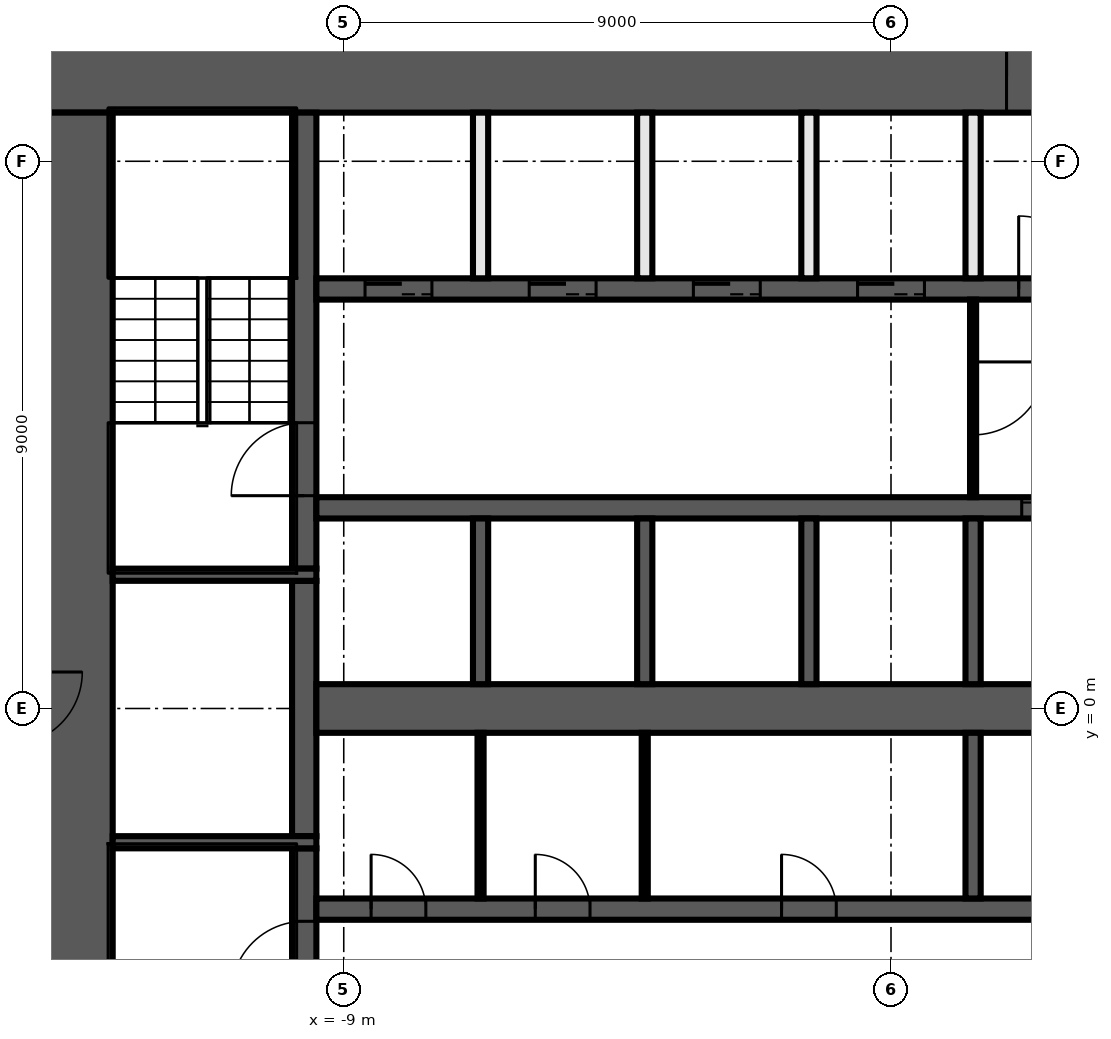
"""IFC4 building model, lengths in metres.
Left out: names, types, materials, properties, quantities, classifications, styles, units other than length and angle.
Written with IfcOpenShell. Run it as: python <this file> out.ifc"""

import sys

from ifc_helpers import new_model, si_unit, direction, frame, frame_2d, origin, place, context, subcontext, project, spatial, rectangle, extrude, element, fill, save


model = new_model("IFC4")
c1 = context("Model", 3, precision=1e-05, world=origin(), true_north=direction((0.0, 1.0)))
c2 = subcontext(c1, "Body", "Model", "MODEL_VIEW")
j1 = project(units=[si_unit("LENGTHUNIT", "METRE"), si_unit("PLANEANGLEUNIT", "RADIAN")], contexts=[c1])
p1 = place(None, origin())
s1 = spatial("IfcSite", under=j1, at=p1, CompositionType="ELEMENT")
p2 = place(p1, origin())
s2 = spatial("IfcBuilding", under=s1, at=p2, CompositionType="ELEMENT")
p3 = place(p2, frame((0.0, 0.0, -11.5)))
s3 = spatial("IfcBuildingStorey", under=s2, at=p3, CompositionType="ELEMENT", Elevation=-11.5)
p4 = place(p3, frame((-14.0, 10.4, 0.0), z_axis=(0.0, 0.0, 1.0), x_axis=(1.0, 0.0, 0.0)))
e1 = element("IfcWall", 1, at=p4, inside=s3, PredefinedType="SHEAR", context=c2, shape_type="SweptSolid", body=[
    extrude(rectangle(XDim=28.0, YDim=1.2, at=frame_2d((14.0, 0.0))), origin(), (0.0, 0.0, 1.0), 5.1),
])
p5 = place(p4, frame((15.9, 0.0, 0.0)))
e2 = element("IfcOpeningElement", 2, at=p5, cuts=e1, PredefinedType="OPENING", context=c2, shape_type="SweptSolid", body=[
    extrude(rectangle(XDim=1.6, YDim=2.1, at=frame_2d((0.8, 1.05))), frame((0.0, 0.61, 0.0), z_axis=(0.0, -1.0, 0.0), x_axis=(1.0, 0.0, 0.0)), (0.0, 0.0, 1.0), 1.22),
])
p6 = place(p3, frame((-13.4, -9.8, 0.0), z_axis=(0.0, 0.0, 1.0), x_axis=(0.0, 1.0, 0.0)))
e3 = element("IfcWall", 3, at=p6, inside=s3, PredefinedType="SHEAR", context=c2, shape_type="SweptSolid", body=[
    extrude(rectangle(XDim=19.6, YDim=1.2, at=frame_2d((9.8, 0.0))), origin(), (0.0, 0.0, 1.0), 5.1),
])
p7 = place(p3, frame((-9.65, -9.8, 0.0), z_axis=(0.0, 0.0, 1.0), x_axis=(0.0, 1.0, 0.0)))
e4 = element("IfcWall", 4, at=p7, inside=s3, PredefinedType="SHEAR", context=c2, shape_type="SweptSolid", body=[
    extrude(rectangle(XDim=7.5, YDim=0.4, at=frame_2d((3.75, 0.0))), origin(), (0.0, 0.0, 1.0), 5.1),
])
p8 = place(p7, frame((5.1, 0.0, 0.0)))
e5 = element("IfcOpeningElement", 5, at=p8, cuts=e4, PredefinedType="OPENING", context=c2, shape_type="SweptSolid", body=[
    extrude(rectangle(XDim=1.2, YDim=2.1, at=frame_2d((0.6, 1.05))), frame((0.0, 0.21, 0.0), z_axis=(0.0, -1.0, 0.0), x_axis=(1.0, 0.0, 0.0)), (0.0, 0.0, 1.0), 0.42),
])
p9 = place(p3, frame((-9.65, -2.1, 0.0), z_axis=(0.0, 0.0, 1.0), x_axis=(0.0, 1.0, 0.0)))
e6 = element("IfcWall", 6, at=p9, inside=s3, PredefinedType="SHEAR", context=c2, shape_type="SweptSolid", body=[
    extrude(rectangle(XDim=4.2, YDim=0.4, at=frame_2d((2.1, 0.0))), origin(), (0.0, 0.0, 1.0), 5.1),
])
p10 = place(p3, frame((-9.65, 2.3, 0.0), z_axis=(0.0, 0.0, 1.0), x_axis=(0.0, 1.0, 0.0)))
e7 = element("IfcWall", 7, at=p10, inside=s3, PredefinedType="SHEAR", context=c2, shape_type="SweptSolid", body=[
    extrude(rectangle(XDim=7.5, YDim=0.4, at=frame_2d((3.75, 0.0))), origin(), (0.0, 0.0, 1.0), 5.1),
])
p11 = place(p10, frame((1.2, 0.0, 0.0)))
e8 = element("IfcOpeningElement", 8, at=p11, cuts=e7, PredefinedType="OPENING", context=c2, shape_type="SweptSolid", body=[
    extrude(rectangle(XDim=1.2, YDim=2.1, at=frame_2d((0.6, 1.05))), frame((0.0, 0.21, 0.0), z_axis=(0.0, -1.0, 0.0), x_axis=(1.0, 0.0, 0.0)), (0.0, 0.0, 1.0), 0.42),
])
for number, where, z_axis, x_axis in (
    (9, (-9.45, 2.2, 0.0), (0.0, 0.0, 1.0), (-1.0, 0.0, 0.0)),
    (10, (-9.45, -2.2, 0.0), (0.0, 0.0, 1.0), (-1.0, 0.0, 0.0)),
):
    element("IfcWall", number, at=place(p3, frame(where, z_axis=z_axis, x_axis=x_axis)), inside=s3, PredefinedType="SHEAR", context=c2, shape_type="SweptSolid", body=[
        extrude(rectangle(XDim=3.35, YDim=0.2, at=frame_2d((1.675, 0.0))), origin(), (0.0, 0.0, 1.0), 5.1),
    ])
p12 = place(p3, frame((-9.45, 6.9, 0.0), z_axis=(0.0, 0.0, 1.0), x_axis=(1.0, 0.0, 0.0)))
e11 = element("IfcWall", 11, at=p12, inside=s3, PredefinedType="SHEAR", context=c2, shape_type="SweptSolid", body=[
    extrude(rectangle(XDim=18.9, YDim=0.35, at=frame_2d((9.45, 0.0))), origin(), (0.0, 0.0, 1.0), 5.1),
])
p13 = place(p12, frame((0.8, 0.0, 0.0)))
e12 = element("IfcOpeningElement", 12, at=p13, cuts=e11, PredefinedType="OPENING", context=c2, shape_type="SweptSolid", body=[
    extrude(rectangle(XDim=1.1, YDim=2.1, at=frame_2d((0.55, 1.05))), frame((0.0, 0.185, 0.0), z_axis=(0.0, -1.0, 0.0), x_axis=(1.0, 0.0, 0.0)), (0.0, 0.0, 1.0), 0.37),
])
p14 = place(p12, frame((3.5, 0.0, 0.0)))
e13 = element("IfcOpeningElement", 13, at=p14, cuts=e11, PredefinedType="OPENING", context=c2, shape_type="SweptSolid", body=[
    extrude(rectangle(XDim=1.1, YDim=2.1, at=frame_2d((0.55, 1.05))), frame((0.0, 0.185, 0.0), z_axis=(0.0, -1.0, 0.0), x_axis=(1.0, 0.0, 0.0)), (0.0, 0.0, 1.0), 0.37),
])
p15 = place(p12, frame((6.2, 0.0, 0.0)))
e14 = element("IfcOpeningElement", 14, at=p15, cuts=e11, PredefinedType="OPENING", context=c2, shape_type="SweptSolid", body=[
    extrude(rectangle(XDim=1.1, YDim=2.1, at=frame_2d((0.55, 1.05))), frame((0.0, 0.185, 0.0), z_axis=(0.0, -1.0, 0.0), x_axis=(1.0, 0.0, 0.0)), (0.0, 0.0, 1.0), 0.37),
])
p16 = place(p12, frame((8.9, 0.0, 0.0)))
e15 = element("IfcOpeningElement", 15, at=p16, cuts=e11, PredefinedType="OPENING", context=c2, shape_type="SweptSolid", body=[
    extrude(rectangle(XDim=1.1, YDim=2.1, at=frame_2d((0.55, 1.05))), frame((0.0, 0.185, 0.0), z_axis=(0.0, -1.0, 0.0), x_axis=(1.0, 0.0, 0.0)), (0.0, 0.0, 1.0), 0.37),
])
p17 = place(p12, frame((11.55, 0.0, 0.0)))
e16 = element("IfcOpeningElement", 16, at=p17, cuts=e11, PredefinedType="OPENING", context=c2, shape_type="SweptSolid", body=[
    extrude(rectangle(XDim=1.2, YDim=2.1, at=frame_2d((0.6, 1.05))), frame((0.0, 0.185, 0.0), z_axis=(0.0, -1.0, 0.0), x_axis=(1.0, 0.0, 0.0)), (0.0, 0.0, 1.0), 0.37),
])
p18 = place(p12, frame((14.3, 0.0, 0.0)))
e17 = element("IfcOpeningElement", 17, at=p18, cuts=e11, PredefinedType="OPENING", context=c2, shape_type="SweptSolid", body=[
    extrude(rectangle(XDim=1.1, YDim=2.1, at=frame_2d((0.55, 1.05))), frame((0.0, 0.185, 0.0), z_axis=(0.0, -1.0, 0.0), x_axis=(1.0, 0.0, 0.0)), (0.0, 0.0, 1.0), 0.37),
])
p19 = place(p12, frame((17.0, 0.0, 0.0)))
e18 = element("IfcOpeningElement", 18, at=p19, cuts=e11, PredefinedType="OPENING", context=c2, shape_type="SweptSolid", body=[
    extrude(rectangle(XDim=1.1, YDim=2.1, at=frame_2d((0.55, 1.05))), frame((0.0, 0.185, 0.0), z_axis=(0.0, -1.0, 0.0), x_axis=(1.0, 0.0, 0.0)), (0.0, 0.0, 1.0), 0.37),
])
p20 = place(p3, frame((9.45, 3.3, 0.0), z_axis=(0.0, 0.0, 1.0), x_axis=(-1.0, 0.0, 0.0)))
e19 = element("IfcWall", 19, at=p20, inside=s3, PredefinedType="SHEAR", context=c2, shape_type="SweptSolid", body=[
    extrude(rectangle(XDim=18.9, YDim=0.35, at=frame_2d((9.45, 0.0))), origin(), (0.0, 0.0, 1.0), 5.1),
])
p21 = place(p20, frame((6.2, 0.0, 0.0)))
e20 = element("IfcOpeningElement", 20, at=p21, cuts=e19, PredefinedType="OPENING", context=c2, shape_type="SweptSolid", body=[
    extrude(rectangle(XDim=1.1, YDim=2.1, at=frame_2d((0.55, 1.05))), frame((0.0, 0.185, 0.0), z_axis=(0.0, -1.0, 0.0), x_axis=(1.0, 0.0, 0.0)), (0.0, 0.0, 1.0), 0.37),
])
p22 = place(p20, frame((3.5, 0.0, 0.0)))
e21 = element("IfcOpeningElement", 21, at=p22, cuts=e19, PredefinedType="OPENING", context=c2, shape_type="SweptSolid", body=[
    extrude(rectangle(XDim=1.1, YDim=2.1, at=frame_2d((0.55, 1.05))), frame((0.0, 0.185, 0.0), z_axis=(0.0, -1.0, 0.0), x_axis=(1.0, 0.0, 0.0)), (0.0, 0.0, 1.0), 0.37),
])
p23 = place(p20, frame((0.9, 0.0, 0.0)))
e22 = element("IfcOpeningElement", 22, at=p23, cuts=e19, PredefinedType="OPENING", context=c2, shape_type="SweptSolid", body=[
    extrude(rectangle(XDim=0.9, YDim=2.1, at=frame_2d((0.45, 1.05))), frame((0.0, 0.185, 0.0), z_axis=(0.0, -1.0, 0.0), x_axis=(1.0, 0.0, 0.0)), (0.0, 0.0, 1.0), 0.37),
])
p24 = place(p3, frame((-9.45, -3.3, 0.0), z_axis=(0.0, 0.0, 1.0), x_axis=(1.0, 0.0, 0.0)))
e23 = element("IfcWall", 23, at=p24, inside=s3, PredefinedType="SHEAR", context=c2, shape_type="SweptSolid", body=[
    extrude(rectangle(XDim=18.9, YDim=0.35, at=frame_2d((9.45, 0.0))), origin(), (0.0, 0.0, 1.0), 5.1),
])
p25 = place(p24, frame((17.0, 0.0, 0.0)))
e24 = element("IfcOpeningElement", 24, at=p25, cuts=e23, PredefinedType="OPENING", context=c2, shape_type="SweptSolid", body=[
    extrude(rectangle(XDim=1.1, YDim=2.1, at=frame_2d((0.55, 1.05))), frame((0.0, 0.185, 0.0), z_axis=(0.0, -1.0, 0.0), x_axis=(1.0, 0.0, 0.0)), (0.0, 0.0, 1.0), 0.37),
])
p26 = place(p24, frame((0.9, 0.0, 0.0)))
e25 = element("IfcOpeningElement", 25, at=p26, cuts=e23, PredefinedType="OPENING", context=c2, shape_type="SweptSolid", body=[
    extrude(rectangle(XDim=0.9, YDim=2.1, at=frame_2d((0.45, 1.05))), frame((0.0, 0.185, 0.0), z_axis=(0.0, -1.0, 0.0), x_axis=(1.0, 0.0, 0.0)), (0.0, 0.0, 1.0), 0.37),
])
p27 = place(p24, frame((3.6, 0.0, 0.0)))
e26 = element("IfcOpeningElement", 26, at=p27, cuts=e23, PredefinedType="OPENING", context=c2, shape_type="SweptSolid", body=[
    extrude(rectangle(XDim=0.9, YDim=2.1, at=frame_2d((0.45, 1.05))), frame((0.0, 0.185, 0.0), z_axis=(0.0, -1.0, 0.0), x_axis=(1.0, 0.0, 0.0)), (0.0, 0.0, 1.0), 0.37),
])
p28 = place(p24, frame((7.65, 0.0, 0.0)))
e27 = element("IfcOpeningElement", 27, at=p28, cuts=e23, PredefinedType="OPENING", context=c2, shape_type="SweptSolid", body=[
    extrude(rectangle(XDim=0.9, YDim=2.1, at=frame_2d((0.45, 1.05))), frame((0.0, 0.185, 0.0), z_axis=(0.0, -1.0, 0.0), x_axis=(1.0, 0.0, 0.0)), (0.0, 0.0, 1.0), 0.37),
])
p29 = place(p3, frame((-9.45, 0.0, 0.0), z_axis=(0.0, 0.0, 1.0), x_axis=(1.0, 0.0, 0.0)))
e28 = element("IfcWall", 28, at=p29, inside=s3, PredefinedType="SHEAR", context=c2, shape_type="SweptSolid", body=[
    extrude(rectangle(XDim=18.9, YDim=0.8, at=frame_2d((9.45, 0.0))), origin(), (0.0, 0.0, 1.0), 5.1),
])
p30 = place(p3, frame((1.35, 6.725, 0.0), z_axis=(0.0, 0.0, 1.0), x_axis=(0.0, -1.0, 0.0)))
e29 = element("IfcWall", 29, at=p30, inside=s3, PredefinedType="PARTITIONING", context=c2, shape_type="SweptSolid", body=[
    extrude(rectangle(XDim=3.25, YDim=0.1, at=frame_2d((1.625, 0.0))), origin(), (0.0, 0.0, 1.0), 5.1),
])
p31 = place(p30, frame((1.025, 0.0, 0.0)))
e30 = element("IfcOpeningElement", 30, at=p31, cuts=e29, PredefinedType="OPENING", context=c2, shape_type="SweptSolid", body=[
    extrude(rectangle(XDim=1.2, YDim=2.1, at=frame_2d((0.6, 1.05))), frame((0.0, 0.06, 0.0), z_axis=(0.0, -1.0, 0.0), x_axis=(1.0, 0.0, 0.0)), (0.0, 0.0, 1.0), 0.12),
])
for number, where, z_axis, x_axis in (
    (31, (1.35, -3.125, 0.0), (0.0, 0.0, 1.0), (0.0, 1.0, 0.0)),
    (32, (1.35, 0.4, 0.0), (0.0, 0.0, 1.0), (0.0, 1.0, 0.0)),
):
    element("IfcWall", number, at=place(p3, frame(where, z_axis=z_axis, x_axis=x_axis)), inside=s3, PredefinedType="SHEAR", context=c2, shape_type="SweptSolid", body=[
        extrude(rectangle(XDim=2.725, YDim=0.25, at=frame_2d((1.363, 0.0))), origin(), (0.0, 0.0, 1.0), 5.1),
    ])
p32 = place(p3, frame((1.35, 7.075, 0.0), z_axis=(0.0, 0.0, 1.0), x_axis=(0.0, 1.0, 0.0)))
e33 = element("IfcWall", 33, at=p32, inside=s3, PredefinedType="SOLIDWALL", context=c2, shape_type="SweptSolid", body=[
    extrude(rectangle(XDim=2.725, YDim=0.25, at=frame_2d((1.363, 0.0))), origin(), (0.0, 0.0, 1.0), 5.1),
])
p33 = place(p3, frame((-1.35, 0.4, 0.0), z_axis=(0.0, 0.0, 1.0), x_axis=(0.0, 1.0, 0.0)))
e34 = element("IfcWall", 34, at=p33, inside=s3, PredefinedType="SHEAR", context=c2, shape_type="SweptSolid", body=[
    extrude(rectangle(XDim=2.725, YDim=0.25, at=frame_2d((1.363, 0.0))), origin(), (0.0, 0.0, 1.0), 5.1),
])
p34 = place(p3, frame((-1.35, 7.075, 0.0), z_axis=(0.0, 0.0, 1.0), x_axis=(0.0, 1.0, 0.0)))
e35 = element("IfcWall", 35, at=p34, inside=s3, PredefinedType="SOLIDWALL", context=c2, shape_type="SweptSolid", body=[
    extrude(rectangle(XDim=2.725, YDim=0.25, at=frame_2d((1.363, 0.0))), origin(), (0.0, 0.0, 1.0), 5.1),
])
p35 = place(p3, frame((-4.05, -3.125, 0.0), z_axis=(0.0, 0.0, 1.0), x_axis=(0.0, 1.0, 0.0)))
e36 = element("IfcWall", 36, at=p35, inside=s3, PredefinedType="PARTITIONING", context=c2, shape_type="SweptSolid", body=[
    extrude(rectangle(XDim=2.725, YDim=0.1, at=frame_2d((1.363, 0.0))), origin(), (0.0, 0.0, 1.0), 5.1),
])
p36 = place(p3, frame((-4.05, 0.4, 0.0), z_axis=(0.0, 0.0, 1.0), x_axis=(0.0, 1.0, 0.0)))
e37 = element("IfcWall", 37, at=p36, inside=s3, PredefinedType="SHEAR", context=c2, shape_type="SweptSolid", body=[
    extrude(rectangle(XDim=2.725, YDim=0.25, at=frame_2d((1.363, 0.0))), origin(), (0.0, 0.0, 1.0), 5.1),
])
p37 = place(p3, frame((-4.05, 7.075, 0.0), z_axis=(0.0, 0.0, 1.0), x_axis=(0.0, 1.0, 0.0)))
e38 = element("IfcWall", 38, at=p37, inside=s3, PredefinedType="SOLIDWALL", context=c2, shape_type="SweptSolid", body=[
    extrude(rectangle(XDim=2.725, YDim=0.25, at=frame_2d((1.363, 0.0))), origin(), (0.0, 0.0, 1.0), 5.1),
])
p38 = place(p3, frame((-6.75, -3.125, 0.0), z_axis=(0.0, 0.0, 1.0), x_axis=(0.0, 1.0, 0.0)))
e39 = element("IfcWall", 39, at=p38, inside=s3, PredefinedType="PARTITIONING", context=c2, shape_type="SweptSolid", body=[
    extrude(rectangle(XDim=2.725, YDim=0.1, at=frame_2d((1.363, 0.0))), origin(), (0.0, 0.0, 1.0), 5.1),
])
p39 = place(p3, frame((-6.75, 0.4, 0.0), z_axis=(0.0, 0.0, 1.0), x_axis=(0.0, 1.0, 0.0)))
e40 = element("IfcWall", 40, at=p39, inside=s3, PredefinedType="SHEAR", context=c2, shape_type="SweptSolid", body=[
    extrude(rectangle(XDim=2.725, YDim=0.25, at=frame_2d((1.363, 0.0))), origin(), (0.0, 0.0, 1.0), 5.1),
])
p40 = place(p3, frame((-6.75, 7.075, 0.0), z_axis=(0.0, 0.0, 1.0), x_axis=(0.0, 1.0, 0.0)))
e41 = element("IfcWall", 41, at=p40, inside=s3, PredefinedType="SOLIDWALL", context=c2, shape_type="SweptSolid", body=[
    extrude(rectangle(XDim=2.725, YDim=0.25, at=frame_2d((1.363, 0.0))), origin(), (0.0, 0.0, 1.0), 5.1),
])
p41 = place(p13, origin())
e42 = element("IfcDoor", 42, at=p41, inside=s3, OperationType="DOUBLE_DOOR_SLIDING", PredefinedType="DOOR", context=c2, shape_type="SweptSolid", body=[
    extrude(rectangle(XDim=1.1, YDim=2.1, at=frame_2d((0.55, 1.05))), frame((0.0, 0.025, 0.0), z_axis=(0.0, -1.0, 0.0), x_axis=(1.0, 0.0, 0.0)), (0.0, 0.0, 1.0), 0.05),
])
fill(e12, e42)
p42 = place(p14, origin())
e43 = element("IfcDoor", 43, at=p42, inside=s3, OperationType="DOUBLE_DOOR_SLIDING", PredefinedType="DOOR", context=c2, shape_type="SweptSolid", body=[
    extrude(rectangle(XDim=1.1, YDim=2.1, at=frame_2d((0.55, 1.05))), frame((0.0, 0.025, 0.0), z_axis=(0.0, -1.0, 0.0), x_axis=(1.0, 0.0, 0.0)), (0.0, 0.0, 1.0), 0.05),
])
fill(e13, e43)
p43 = place(p15, origin())
e44 = element("IfcDoor", 44, at=p43, inside=s3, OperationType="DOUBLE_DOOR_SLIDING", PredefinedType="DOOR", context=c2, shape_type="SweptSolid", body=[
    extrude(rectangle(XDim=1.1, YDim=2.1, at=frame_2d((0.55, 1.05))), frame((0.0, 0.025, 0.0), z_axis=(0.0, -1.0, 0.0), x_axis=(1.0, 0.0, 0.0)), (0.0, 0.0, 1.0), 0.05),
])
fill(e14, e44)
p44 = place(p16, origin())
e45 = element("IfcDoor", 45, at=p44, inside=s3, OperationType="DOUBLE_DOOR_SLIDING", PredefinedType="DOOR", context=c2, shape_type="SweptSolid", body=[
    extrude(rectangle(XDim=1.1, YDim=2.1, at=frame_2d((0.55, 1.05))), frame((0.0, 0.025, 0.0), z_axis=(0.0, -1.0, 0.0), x_axis=(1.0, 0.0, 0.0)), (0.0, 0.0, 1.0), 0.05),
])
fill(e15, e45)
p45 = place(p5, origin())
e46 = element("IfcDoor", 46, at=p45, inside=s3, OperationType="DOUBLE_DOOR_SINGLE_SWING", PredefinedType="DOOR", context=c2, shape_type="SweptSolid", body=[
    extrude(rectangle(XDim=1.6, YDim=2.1, at=frame_2d((0.8, 1.05))), frame((0.0, 0.025, 0.0), z_axis=(0.0, -1.0, 0.0), x_axis=(1.0, 0.0, 0.0)), (0.0, 0.0, 1.0), 0.05),
])
fill(e2, e46)
p46 = place(p17, origin())
e47 = element("IfcDoor", 47, at=p46, inside=s3, OperationType="SINGLE_SWING_LEFT", PredefinedType="DOOR", context=c2, shape_type="SweptSolid", body=[
    extrude(rectangle(XDim=1.2, YDim=2.1, at=frame_2d((0.6, 1.05))), frame((0.0, 0.025, 0.0), z_axis=(0.0, -1.0, 0.0), x_axis=(1.0, 0.0, 0.0)), (0.0, 0.0, 1.0), 0.05),
])
fill(e16, e47)
p47 = place(p21, origin())
e48 = element("IfcDoor", 48, at=p47, inside=s3, OperationType="DOUBLE_DOOR_SLIDING", PredefinedType="DOOR", context=c2, shape_type="SweptSolid", body=[
    extrude(rectangle(XDim=1.1, YDim=2.1, at=frame_2d((0.55, 1.05))), frame((0.0, 0.025, 0.0), z_axis=(0.0, -1.0, 0.0), x_axis=(1.0, 0.0, 0.0)), (0.0, 0.0, 1.0), 0.05),
])
fill(e20, e48)
p48 = place(p26, origin())
e49 = element("IfcDoor", 49, at=p48, inside=s3, OperationType="SINGLE_SWING_RIGHT", PredefinedType="DOOR", context=c2, shape_type="SweptSolid", body=[
    extrude(rectangle(XDim=0.9, YDim=2.1, at=frame_2d((0.45, 1.05))), frame((0.0, 0.025, 0.0), z_axis=(0.0, -1.0, 0.0), x_axis=(1.0, 0.0, 0.0)), (0.0, 0.0, 1.0), 0.05),
])
fill(e25, e49)
p49 = place(p27, origin())
e50 = element("IfcDoor", 50, at=p49, inside=s3, OperationType="SINGLE_SWING_LEFT", PredefinedType="DOOR", context=c2, shape_type="SweptSolid", body=[
    extrude(rectangle(XDim=0.9, YDim=2.1, at=frame_2d((0.45, 1.05))), frame((0.0, 0.025, 0.0), z_axis=(0.0, -1.0, 0.0), x_axis=(1.0, 0.0, 0.0)), (0.0, 0.0, 1.0), 0.05),
])
fill(e26, e50)
p50 = place(p28, origin())
e51 = element("IfcDoor", 51, at=p50, inside=s3, OperationType="SINGLE_SWING_RIGHT", PredefinedType="DOOR", context=c2, shape_type="SweptSolid", body=[
    extrude(rectangle(XDim=0.9, YDim=2.1, at=frame_2d((0.45, 1.05))), frame((0.0, 0.025, 0.0), z_axis=(0.0, -1.0, 0.0), x_axis=(1.0, 0.0, 0.0)), (0.0, 0.0, 1.0), 0.05),
])
fill(e27, e51)
p51 = place(p11, origin())
e52 = element("IfcDoor", 52, at=p51, inside=s3, OperationType="SINGLE_SWING_RIGHT", PredefinedType="DOOR", context=c2, shape_type="SweptSolid", body=[
    extrude(rectangle(XDim=1.2, YDim=2.1, at=frame_2d((0.6, 1.05))), frame((0.0, 0.025, 0.0), z_axis=(0.0, -1.0, 0.0), x_axis=(1.0, 0.0, 0.0)), (0.0, 0.0, 1.0), 0.05),
])
fill(e8, e52)
p52 = place(p8, origin())
e53 = element("IfcDoor", 53, at=p52, inside=s3, OperationType="SINGLE_SWING_LEFT", PredefinedType="DOOR", context=c2, shape_type="SweptSolid", body=[
    extrude(rectangle(XDim=1.2, YDim=2.1, at=frame_2d((0.6, 1.05))), frame((0.0, 0.025, 0.0), z_axis=(0.0, -1.0, 0.0), x_axis=(1.0, 0.0, 0.0)), (0.0, 0.0, 1.0), 0.05),
])
fill(e5, e53)
p53 = place(p31, origin())
e54 = element("IfcDoor", 54, at=p53, inside=s3, OperationType="SINGLE_SWING_LEFT", PredefinedType="DOOR", context=c2, shape_type="SweptSolid", body=[
    extrude(rectangle(XDim=1.2, YDim=2.1, at=frame_2d((0.6, 1.05))), frame((0.0, 0.025, 0.0), z_axis=(0.0, -1.0, 0.0), x_axis=(1.0, 0.0, 0.0)), (0.0, 0.0, 1.0), 0.05),
])
fill(e30, e54)
save(model, sys.argv[1])
